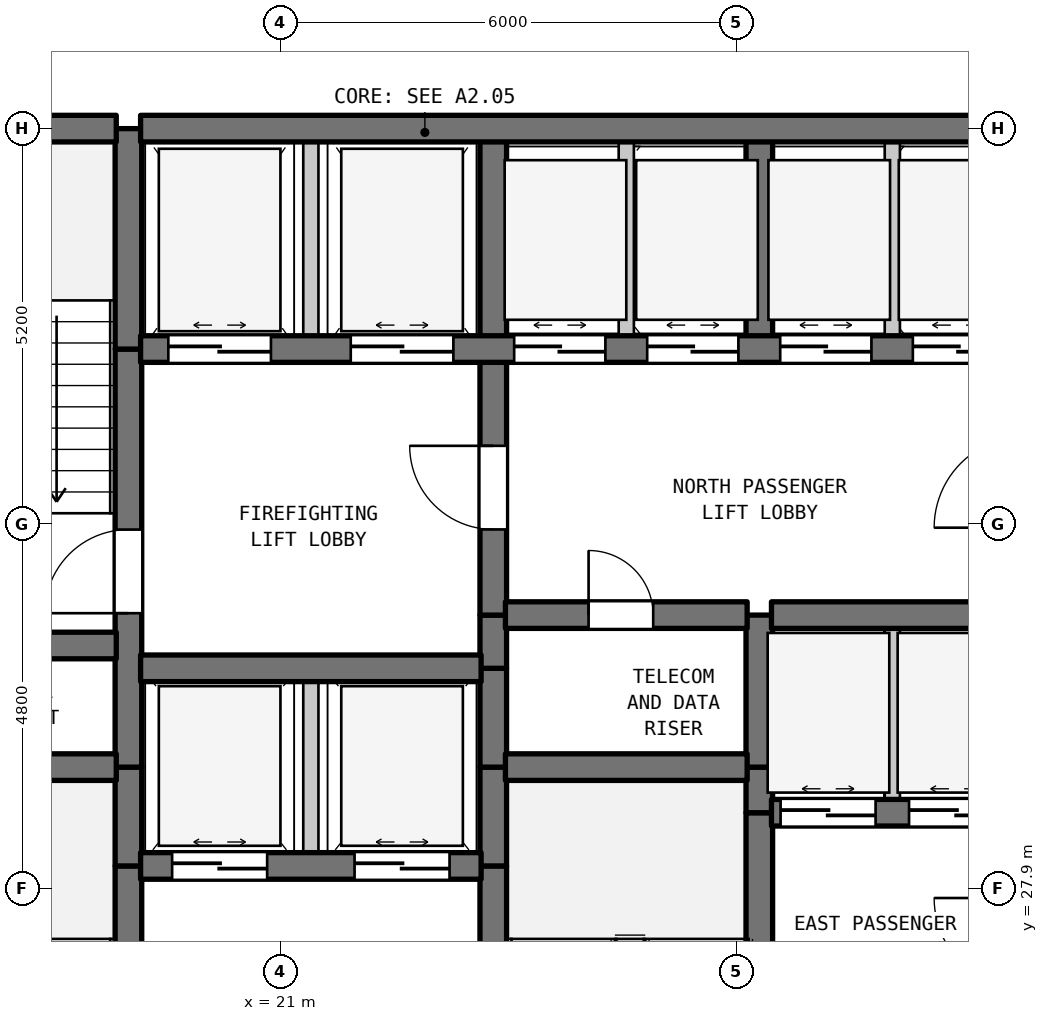
"""IFC4 building model, lengths in metres.
Left out: names, types, materials, properties, quantities, classifications, styles, units other than length and angle.
Written with IfcOpenShell. Run it as: python <this file> out.ifc"""

import sys

from ifc_helpers import new_model, si_unit, direction, frame, frame_2d, origin, place, context, subcontext, project, spatial, rectangle, extrude, element, fill, save


model = new_model("IFC4")
c1 = context("Model", 3, precision=1e-05, world=origin(), true_north=direction((0.0, 1.0)))
c2 = subcontext(c1, "Body", "Model", "MODEL_VIEW")
j1 = project(units=[si_unit("LENGTHUNIT", "METRE"), si_unit("PLANEANGLEUNIT", "RADIAN")], contexts=[c1])
p1 = place(None, origin())
s1 = spatial("IfcSite", under=j1, at=p1, CompositionType="ELEMENT")
p2 = place(p1, origin())
s2 = spatial("IfcBuilding", under=s1, at=p2, CompositionType="ELEMENT")
p3 = place(p2, frame((0.0, 0.0, 53.6)))
s3 = spatial("IfcBuildingStorey", under=s2, at=p3, CompositionType="ELEMENT", Elevation=53.6)
p4 = place(p3, frame((19.0, 22.7, 0.0), z_axis=(0.0, 0.0, 1.0), x_axis=(0.0, 1.0, 0.0)))
e1 = element("IfcWall", 1, at=p4, inside=s3, PredefinedType="SHEAR", context=c2, shape_type="SweptSolid", body=[
    extrude(rectangle(XDim=5.5, YDim=0.35, at=frame_2d((2.75, 0.0))), origin(), (0.0, 0.0, 1.0), 3.385),
])
p5 = place(p4, frame((0.631, 0.0, 0.0)))
e2 = element("IfcOpeningElement", 2, at=p5, cuts=e1, PredefinedType="OPENING", context=c2, shape_type="SweptSolid", body=[
    extrude(rectangle(XDim=1.1, YDim=2.15, at=frame_2d((0.55, 1.075))), frame((0.0, 0.185, 0.0), z_axis=(0.0, -1.0, 0.0), x_axis=(1.0, 0.0, 0.0)), (0.0, 0.0, 1.0), 0.37),
])
p6 = place(p3, frame((19.0, 28.2, 0.0), z_axis=(0.0, 0.0, 1.0), x_axis=(0.0, 1.0, 0.0)))
e3 = element("IfcWall", 3, at=p6, inside=s3, PredefinedType="SHEAR", context=c2, shape_type="SweptSolid", body=[
    extrude(rectangle(XDim=1.3, YDim=0.35, at=frame_2d((0.65, 0.0))), origin(), (0.0, 0.0, 1.0), 3.385),
])
p7 = place(p3, frame((19.0, 29.5, 0.0), z_axis=(0.0, 0.0, 1.0), x_axis=(0.0, 1.0, 0.0)))
e4 = element("IfcWall", 4, at=p7, inside=s3, PredefinedType="SHEAR", context=c2, shape_type="SweptSolid", body=[
    extrude(rectangle(XDim=5.5, YDim=0.35, at=frame_2d((2.75, 0.0))), origin(), (0.0, 0.0, 1.0), 3.385),
])
p8 = place(p7, frame((2.025, 0.0, 0.0)))
e5 = element("IfcOpeningElement", 5, at=p8, cuts=e4, PredefinedType="OPENING", context=c2, shape_type="SweptSolid", body=[
    extrude(rectangle(XDim=1.1, YDim=2.15, at=frame_2d((0.55, 1.075))), frame((0.0, 0.185, 0.0), z_axis=(0.0, -1.0, 0.0), x_axis=(1.0, 0.0, 0.0)), (0.0, 0.0, 1.0), 0.37),
])
p9 = place(p3, frame((19.0, 35.0, 0.0), z_axis=(0.0, 0.0, 1.0), x_axis=(0.0, 1.0, 0.0)))
e6 = element("IfcWall", 6, at=p9, inside=s3, PredefinedType="SHEAR", context=c2, shape_type="SweptSolid", body=[
    extrude(rectangle(XDim=2.9, YDim=0.35, at=frame_2d((1.45, 0.0))), origin(), (0.0, 0.0, 1.0), 3.385),
])
p10 = place(p3, frame((21.4, 28.2, 0.0), z_axis=(0.0, 0.0, 1.0), x_axis=(0.0, 1.0, 0.0)))
e7 = element("IfcWall", 7, at=p10, inside=s3, PredefinedType="STANDARD", context=c2, shape_type="SweptSolid", body=[
    extrude(rectangle(XDim=2.6, YDim=0.2, at=frame_2d((1.3, 0.0))), origin(), (0.0, 0.0, 1.0), 3.385),
])
p11 = place(p3, frame((21.4, 35.0, 0.0), z_axis=(0.0, 0.0, 1.0), x_axis=(0.0, 1.0, 0.0)))
e8 = element("IfcWall", 8, at=p11, inside=s3, PredefinedType="STANDARD", context=c2, shape_type="SweptSolid", body=[
    extrude(rectangle(XDim=2.9, YDim=0.2, at=frame_2d((1.45, 0.0))), origin(), (0.0, 0.0, 1.0), 3.385),
])
p12 = place(p3, frame((23.8, 22.7, 0.0), z_axis=(0.0, 0.0, 1.0), x_axis=(0.0, 1.0, 0.0)))
e9 = element("IfcWall", 9, at=p12, inside=s3, PredefinedType="SHEAR", context=c2, shape_type="SweptSolid", body=[
    extrude(rectangle(XDim=5.5, YDim=0.35, at=frame_2d((2.75, 0.0))), origin(), (0.0, 0.0, 1.0), 3.385),
])
p13 = place(p12, frame((0.235, 0.0, 0.0)))
e10 = element("IfcOpeningElement", 10, at=p13, cuts=e9, PredefinedType="OPENING", context=c2, shape_type="SweptSolid", body=[
    extrude(rectangle(XDim=1.1, YDim=2.15, at=frame_2d((0.55, 1.075))), frame((0.0, 0.185, 0.0), z_axis=(0.0, -1.0, 0.0), x_axis=(1.0, 0.0, 0.0)), (0.0, 0.0, 1.0), 0.37),
])
for number, where, z_axis, x_axis in (
    (11, (23.8, 28.2, 0.0), (0.0, 0.0, 1.0), (0.0, 1.0, 0.0)),
    (12, (23.8, 29.5, 0.0), (0.0, 0.0, 1.0), (0.0, 1.0, 0.0)),
):
    element("IfcWall", number, at=place(p3, frame(where, z_axis=z_axis, x_axis=x_axis)), inside=s3, PredefinedType="SHEAR", context=c2, shape_type="SweptSolid", body=[
        extrude(rectangle(XDim=1.3, YDim=0.35, at=frame_2d((0.65, 0.0))), origin(), (0.0, 0.0, 1.0), 3.385),
    ])
p14 = place(p3, frame((23.8, 30.8, 0.0), z_axis=(0.0, 0.0, 1.0), x_axis=(0.0, 1.0, 0.0)))
e13 = element("IfcWall", 13, at=p14, inside=s3, PredefinedType="SHEAR", context=c2, shape_type="SweptSolid", body=[
    extrude(rectangle(XDim=0.7, YDim=0.35, at=frame_2d((0.35, 0.0))), origin(), (0.0, 0.0, 1.0), 3.385),
])
p15 = place(p3, frame((23.8, 31.5, 0.0), z_axis=(0.0, 0.0, 1.0), x_axis=(0.0, 1.0, 0.0)))
e14 = element("IfcWall", 14, at=p15, inside=s3, PredefinedType="SHEAR", context=c2, shape_type="SweptSolid", body=[
    extrude(rectangle(XDim=3.5, YDim=0.35, at=frame_2d((1.75, 0.0))), origin(), (0.0, 0.0, 1.0), 3.385),
])
p16 = place(p15, frame((1.127, 0.0, 0.0)))
e15 = element("IfcOpeningElement", 15, at=p16, cuts=e14, PredefinedType="OPENING", context=c2, shape_type="SweptSolid", body=[
    extrude(rectangle(XDim=1.1, YDim=2.15, at=frame_2d((0.55, 1.075))), frame((0.0, 0.185, 0.0), z_axis=(0.0, -1.0, 0.0), x_axis=(1.0, 0.0, 0.0)), (0.0, 0.0, 1.0), 0.37),
])
p17 = place(p3, frame((23.8, 35.0, 0.0), z_axis=(0.0, 0.0, 1.0), x_axis=(0.0, 1.0, 0.0)))
e16 = element("IfcWall", 16, at=p17, inside=s3, PredefinedType="SHEAR", context=c2, shape_type="SweptSolid", body=[
    extrude(rectangle(XDim=2.9, YDim=0.35, at=frame_2d((1.45, 0.0))), origin(), (0.0, 0.0, 1.0), 3.385),
])
p18 = place(p3, frame((25.55, 35.0, 0.0), z_axis=(0.0, 0.0, 1.0), x_axis=(0.0, 1.0, 0.0)))
e17 = element("IfcWall", 17, at=p18, inside=s3, PredefinedType="STANDARD", context=c2, shape_type="SweptSolid", body=[
    extrude(rectangle(XDim=2.9, YDim=0.2, at=frame_2d((1.45, 0.0))), origin(), (0.0, 0.0, 1.0), 3.385),
])
p19 = place(p3, frame((27.3, 25.6, 0.0), z_axis=(0.0, 0.0, 1.0), x_axis=(0.0, 1.0, 0.0)))
e18 = element("IfcWall", 18, at=p19, inside=s3, PredefinedType="SHEAR", context=c2, shape_type="SweptSolid", body=[
    extrude(rectangle(XDim=3.3, YDim=0.35, at=frame_2d((1.65, 0.0))), origin(), (0.0, 0.0, 1.0), 3.385),
])
p20 = place(p3, frame((27.3, 28.9, 0.0), z_axis=(0.0, 0.0, 1.0), x_axis=(0.0, 1.0, 0.0)))
e19 = element("IfcWall", 19, at=p20, inside=s3, PredefinedType="SHEAR", context=c2, shape_type="SweptSolid", body=[
    extrude(rectangle(XDim=0.6, YDim=0.35, at=frame_2d((0.3, 0.0))), origin(), (0.0, 0.0, 1.0), 3.385),
])
p21 = place(p3, frame((27.3, 29.5, 0.0), z_axis=(0.0, 0.0, 1.0), x_axis=(0.0, 1.0, 0.0)))
e20 = element("IfcWall", 20, at=p21, inside=s3, PredefinedType="SHEAR", context=c2, shape_type="SweptSolid", body=[
    extrude(rectangle(XDim=2.0, YDim=0.35, at=frame_2d((1.0, 0.0))), origin(), (0.0, 0.0, 1.0), 3.385),
])
p22 = place(p3, frame((27.3, 35.0, 0.0), z_axis=(0.0, 0.0, 1.0), x_axis=(0.0, 1.0, 0.0)))
e21 = element("IfcWall", 21, at=p22, inside=s3, PredefinedType="SHEAR", context=c2, shape_type="SweptSolid", body=[
    extrude(rectangle(XDim=2.9, YDim=0.35, at=frame_2d((1.45, 0.0))), origin(), (0.0, 0.0, 1.0), 3.385),
])
p23 = place(p3, frame((29.05, 28.9, 0.0), z_axis=(0.0, 0.0, 1.0), x_axis=(0.0, 1.0, 0.0)))
e22 = element("IfcWall", 22, at=p23, inside=s3, PredefinedType="STANDARD", context=c2, shape_type="SweptSolid", body=[
    extrude(rectangle(XDim=2.6, YDim=0.2, at=frame_2d((1.3, 0.0))), origin(), (0.0, 0.0, 1.0), 3.385),
])
p24 = place(p3, frame((29.05, 35.0, 0.0), z_axis=(0.0, 0.0, 1.0), x_axis=(0.0, 1.0, 0.0)))
e23 = element("IfcWall", 23, at=p24, inside=s3, PredefinedType="STANDARD", context=c2, shape_type="SweptSolid", body=[
    extrude(rectangle(XDim=2.9, YDim=0.2, at=frame_2d((1.45, 0.0))), origin(), (0.0, 0.0, 1.0), 3.385),
])
p25 = place(p3, frame((19.16, 28.2, 0.0), z_axis=(0.0, 0.0, 1.0), x_axis=(1.0, 0.0, 0.0)))
e24 = element("IfcWall", 24, at=p25, inside=s3, PredefinedType="SHEAR", context=c2, shape_type="SweptSolid", body=[
    extrude(rectangle(XDim=4.48, YDim=0.35, at=frame_2d((2.24, 0.0))), origin(), (0.0, 0.0, 1.0), 3.385),
])
p26 = place(p25, frame((0.415, 0.0, 0.0)))
e25 = element("IfcOpeningElement", 25, at=p26, cuts=e24, PredefinedType="OPENING", context=c2, shape_type="SweptSolid", body=[
    extrude(rectangle(XDim=1.25, YDim=2.2, at=frame_2d((0.625, 1.1))), frame((0.0, 0.185, 0.0), z_axis=(0.0, -1.0, 0.0), x_axis=(1.0, 0.0, 0.0)), (0.0, 0.0, 1.0), 0.37),
])
p27 = place(p25, frame((2.815, 0.0, 0.0)))
e26 = element("IfcOpeningElement", 26, at=p27, cuts=e24, PredefinedType="OPENING", context=c2, shape_type="SweptSolid", body=[
    extrude(rectangle(XDim=1.25, YDim=2.2, at=frame_2d((0.625, 1.1))), frame((0.0, 0.185, 0.0), z_axis=(0.0, -1.0, 0.0), x_axis=(1.0, 0.0, 0.0)), (0.0, 0.0, 1.0), 0.37),
])
p28 = place(p3, frame((27.46, 28.9, 0.0), z_axis=(0.0, 0.0, 1.0), x_axis=(1.0, 0.0, 0.0)))
e27 = element("IfcWall", 27, at=p28, inside=s3, PredefinedType="SHEAR", context=c2, shape_type="SweptSolid", body=[
    extrude(rectangle(XDim=3.18, YDim=0.35, at=frame_2d((1.59, 0.0))), origin(), (0.0, 0.0, 1.0), 3.385),
])
p29 = place(p28, frame((0.12, 0.0, 0.0)))
e28 = element("IfcOpeningElement", 28, at=p29, cuts=e27, PredefinedType="OPENING", context=c2, shape_type="SweptSolid", body=[
    extrude(rectangle(XDim=1.25, YDim=2.2, at=frame_2d((0.625, 1.1))), frame((0.0, 0.185, 0.0), z_axis=(0.0, -1.0, 0.0), x_axis=(1.0, 0.0, 0.0)), (0.0, 0.0, 1.0), 0.37),
])
p30 = place(p28, frame((1.81, 0.0, 0.0)))
e29 = element("IfcOpeningElement", 29, at=p30, cuts=e27, PredefinedType="OPENING", context=c2, shape_type="SweptSolid", body=[
    extrude(rectangle(XDim=1.25, YDim=2.2, at=frame_2d((0.625, 1.1))), frame((0.0, 0.185, 0.0), z_axis=(0.0, -1.0, 0.0), x_axis=(1.0, 0.0, 0.0)), (0.0, 0.0, 1.0), 0.37),
])
p31 = place(p3, frame((15.16, 29.5, 0.0), z_axis=(0.0, 0.0, 1.0), x_axis=(1.0, 0.0, 0.0)))
e30 = element("IfcWall", 30, at=p31, inside=s3, PredefinedType="SHEAR", context=c2, shape_type="SweptSolid", body=[
    extrude(rectangle(XDim=3.68, YDim=0.35, at=frame_2d((1.84, 0.0))), origin(), (0.0, 0.0, 1.0), 3.385),
])
p32 = place(p3, frame((23.96, 29.5, 0.0), z_axis=(0.0, 0.0, 1.0), x_axis=(1.0, 0.0, 0.0)))
e31 = element("IfcWall", 31, at=p32, inside=s3, PredefinedType="SHEAR", context=c2, shape_type="SweptSolid", body=[
    extrude(rectangle(XDim=3.18, YDim=0.35, at=frame_2d((1.59, 0.0))), origin(), (0.0, 0.0, 1.0), 3.385),
])
p33 = place(p3, frame((19.16, 30.8, 0.0), z_axis=(0.0, 0.0, 1.0), x_axis=(1.0, 0.0, 0.0)))
e32 = element("IfcWall", 32, at=p33, inside=s3, PredefinedType="SHEAR", context=c2, shape_type="SweptSolid", body=[
    extrude(rectangle(XDim=4.48, YDim=0.35, at=frame_2d((2.24, 0.0))), origin(), (0.0, 0.0, 1.0), 3.385),
])
p34 = place(p3, frame((15.16, 31.1, 0.0), z_axis=(0.0, 0.0, 1.0), x_axis=(1.0, 0.0, 0.0)))
e33 = element("IfcWall", 33, at=p34, inside=s3, PredefinedType="SHEAR", context=c2, shape_type="SweptSolid", body=[
    extrude(rectangle(XDim=3.68, YDim=0.35, at=frame_2d((1.84, 0.0))), origin(), (0.0, 0.0, 1.0), 3.385),
])
p35 = place(p3, frame((23.96, 31.5, 0.0), z_axis=(0.0, 0.0, 1.0), x_axis=(1.0, 0.0, 0.0)))
e34 = element("IfcWall", 34, at=p35, inside=s3, PredefinedType="SHEAR", context=c2, shape_type="SweptSolid", body=[
    extrude(rectangle(XDim=3.18, YDim=0.35, at=frame_2d((1.59, 0.0))), origin(), (0.0, 0.0, 1.0), 3.385),
])
p36 = place(p35, frame((1.094, 0.0, 0.0)))
e35 = element("IfcOpeningElement", 35, at=p36, cuts=e34, PredefinedType="OPENING", context=c2, shape_type="SweptSolid", body=[
    extrude(rectangle(XDim=0.85, YDim=2.1, at=frame_2d((0.425, 1.05))), frame((0.0, 0.185, 0.0), z_axis=(0.0, -1.0, 0.0), x_axis=(1.0, 0.0, 0.0)), (0.0, 0.0, 1.0), 0.37),
])
p37 = place(p3, frame((27.46, 31.5, 0.0), z_axis=(0.0, 0.0, 1.0), x_axis=(1.0, 0.0, 0.0)))
e36 = element("IfcWall", 36, at=p37, inside=s3, PredefinedType="SHEAR", context=c2, shape_type="SweptSolid", body=[
    extrude(rectangle(XDim=3.18, YDim=0.35, at=frame_2d((1.59, 0.0))), origin(), (0.0, 0.0, 1.0), 3.385),
])
p38 = place(p3, frame((19.16, 35.0, 0.0), z_axis=(0.0, 0.0, 1.0), x_axis=(1.0, 0.0, 0.0)))
e37 = element("IfcWall", 37, at=p38, inside=s3, PredefinedType="SHEAR", context=c2, shape_type="SweptSolid", body=[
    extrude(rectangle(XDim=11.48, YDim=0.35, at=frame_2d((5.74, 0.0))), origin(), (0.0, 0.0, 1.0), 3.385),
])
p39 = place(p38, frame((0.365, 0.0, 0.0)))
e38 = element("IfcOpeningElement", 38, at=p39, cuts=e37, PredefinedType="OPENING", context=c2, shape_type="SweptSolid", body=[
    extrude(rectangle(XDim=1.35, YDim=2.2, at=frame_2d((0.675, 1.1))), frame((0.0, 0.185, 0.0), z_axis=(0.0, -1.0, 0.0), x_axis=(1.0, 0.0, 0.0)), (0.0, 0.0, 1.0), 0.37),
])
p40 = place(p38, frame((2.765, 0.0, 0.0)))
e39 = element("IfcOpeningElement", 39, at=p40, cuts=e37, PredefinedType="OPENING", context=c2, shape_type="SweptSolid", body=[
    extrude(rectangle(XDim=1.35, YDim=2.2, at=frame_2d((0.675, 1.1))), frame((0.0, 0.185, 0.0), z_axis=(0.0, -1.0, 0.0), x_axis=(1.0, 0.0, 0.0)), (0.0, 0.0, 1.0), 0.37),
])
p41 = place(p38, frame((4.915, 0.0, 0.0)))
e40 = element("IfcOpeningElement", 40, at=p41, cuts=e37, PredefinedType="OPENING", context=c2, shape_type="SweptSolid", body=[
    extrude(rectangle(XDim=1.2, YDim=2.2, at=frame_2d((0.6, 1.1))), frame((0.0, 0.185, 0.0), z_axis=(0.0, -1.0, 0.0), x_axis=(1.0, 0.0, 0.0)), (0.0, 0.0, 1.0), 0.37),
])
p42 = place(p38, frame((6.665, 0.0, 0.0)))
e41 = element("IfcOpeningElement", 41, at=p42, cuts=e37, PredefinedType="OPENING", context=c2, shape_type="SweptSolid", body=[
    extrude(rectangle(XDim=1.2, YDim=2.2, at=frame_2d((0.6, 1.1))), frame((0.0, 0.185, 0.0), z_axis=(0.0, -1.0, 0.0), x_axis=(1.0, 0.0, 0.0)), (0.0, 0.0, 1.0), 0.37),
])
p43 = place(p38, frame((8.415, 0.0, 0.0)))
e42 = element("IfcOpeningElement", 42, at=p43, cuts=e37, PredefinedType="OPENING", context=c2, shape_type="SweptSolid", body=[
    extrude(rectangle(XDim=1.2, YDim=2.2, at=frame_2d((0.6, 1.1))), frame((0.0, 0.185, 0.0), z_axis=(0.0, -1.0, 0.0), x_axis=(1.0, 0.0, 0.0)), (0.0, 0.0, 1.0), 0.37),
])
p44 = place(p38, frame((10.16, 0.0, 0.0)))
e43 = element("IfcOpeningElement", 43, at=p44, cuts=e37, PredefinedType="OPENING", context=c2, shape_type="SweptSolid", body=[
    extrude(rectangle(XDim=1.2, YDim=2.2, at=frame_2d((0.6, 1.1))), frame((0.0, 0.185, 0.0), z_axis=(0.0, -1.0, 0.0), x_axis=(1.0, 0.0, 0.0)), (0.0, 0.0, 1.0), 0.37),
])
p45 = place(p3, frame((15.16, 37.9, 0.0), z_axis=(0.0, 0.0, 1.0), x_axis=(1.0, 0.0, 0.0)))
e44 = element("IfcWall", 44, at=p45, inside=s3, PredefinedType="SHEAR", context=c2, shape_type="SweptSolid", body=[
    extrude(rectangle(XDim=3.68, YDim=0.35, at=frame_2d((1.84, 0.0))), origin(), (0.0, 0.0, 1.0), 3.385),
])
p46 = place(p3, frame((19.16, 37.9, 0.0), z_axis=(0.0, 0.0, 1.0), x_axis=(1.0, 0.0, 0.0)))
e45 = element("IfcWall", 45, at=p46, inside=s3, PredefinedType="SHEAR", context=c2, shape_type="SweptSolid", body=[
    extrude(rectangle(XDim=11.48, YDim=0.35, at=frame_2d((5.74, 0.0))), origin(), (0.0, 0.0, 1.0), 3.385),
])
p47 = place(p8, origin())
e46 = element("IfcDoor", 46, at=p47, inside=s3, OperationType="SINGLE_SWING_LEFT", PredefinedType="DOOR", context=c2, shape_type="SweptSolid", body=[
    extrude(rectangle(XDim=1.1, YDim=2.15, at=frame_2d((0.55, 1.075))), frame((0.0, 0.025, 0.0), z_axis=(0.0, -1.0, 0.0), x_axis=(1.0, 0.0, 0.0)), (0.0, 0.0, 1.0), 0.05),
])
fill(e5, e46)
p48 = place(p16, origin())
e47 = element("IfcDoor", 47, at=p48, inside=s3, OperationType="SINGLE_SWING_RIGHT", PredefinedType="DOOR", context=c2, shape_type="SweptSolid", body=[
    extrude(rectangle(XDim=1.1, YDim=2.15, at=frame_2d((0.55, 1.075))), frame((0.0, 0.025, 0.0), z_axis=(0.0, -1.0, 0.0), x_axis=(1.0, 0.0, 0.0)), (0.0, 0.0, 1.0), 0.05),
])
fill(e15, e47)
p49 = place(p26, origin())
e48 = element("IfcDoor", 48, at=p49, inside=s3, OperationType="DOUBLE_DOOR_SLIDING", PredefinedType="DOOR", context=c2, shape_type="SweptSolid", body=[
    extrude(rectangle(XDim=1.25, YDim=2.2, at=frame_2d((0.625, 1.1))), frame((0.0, 0.025, 0.0), z_axis=(0.0, -1.0, 0.0), x_axis=(1.0, 0.0, 0.0)), (0.0, 0.0, 1.0), 0.05),
])
fill(e25, e48)
p50 = place(p27, origin())
e49 = element("IfcDoor", 49, at=p50, inside=s3, OperationType="DOUBLE_DOOR_SLIDING", PredefinedType="DOOR", context=c2, shape_type="SweptSolid", body=[
    extrude(rectangle(XDim=1.25, YDim=2.2, at=frame_2d((0.625, 1.1))), frame((0.0, 0.025, 0.0), z_axis=(0.0, -1.0, 0.0), x_axis=(1.0, 0.0, 0.0)), (0.0, 0.0, 1.0), 0.05),
])
fill(e26, e49)
p51 = place(p29, origin())
e50 = element("IfcDoor", 50, at=p51, inside=s3, OperationType="DOUBLE_DOOR_SLIDING", PredefinedType="DOOR", context=c2, shape_type="SweptSolid", body=[
    extrude(rectangle(XDim=1.25, YDim=2.2, at=frame_2d((0.625, 1.1))), frame((0.0, 0.025, 0.0), z_axis=(0.0, -1.0, 0.0), x_axis=(1.0, 0.0, 0.0)), (0.0, 0.0, 1.0), 0.05),
])
fill(e28, e50)
p52 = place(p30, origin())
e51 = element("IfcDoor", 51, at=p52, inside=s3, OperationType="DOUBLE_DOOR_SLIDING", PredefinedType="DOOR", context=c2, shape_type="SweptSolid", body=[
    extrude(rectangle(XDim=1.25, YDim=2.2, at=frame_2d((0.625, 1.1))), frame((0.0, 0.025, 0.0), z_axis=(0.0, -1.0, 0.0), x_axis=(1.0, 0.0, 0.0)), (0.0, 0.0, 1.0), 0.05),
])
fill(e29, e51)
p53 = place(p36, origin())
e52 = element("IfcDoor", 52, at=p53, inside=s3, OperationType="SINGLE_SWING_LEFT", PredefinedType="DOOR", context=c2, shape_type="SweptSolid", body=[
    extrude(rectangle(XDim=0.85, YDim=2.1, at=frame_2d((0.425, 1.05))), frame((0.0, 0.025, 0.0), z_axis=(0.0, -1.0, 0.0), x_axis=(1.0, 0.0, 0.0)), (0.0, 0.0, 1.0), 0.05),
])
fill(e35, e52)
p54 = place(p39, origin())
e53 = element("IfcDoor", 53, at=p54, inside=s3, OperationType="DOUBLE_DOOR_SLIDING", PredefinedType="DOOR", context=c2, shape_type="SweptSolid", body=[
    extrude(rectangle(XDim=1.35, YDim=2.2, at=frame_2d((0.675, 1.1))), frame((0.0, 0.025, 0.0), z_axis=(0.0, -1.0, 0.0), x_axis=(1.0, 0.0, 0.0)), (0.0, 0.0, 1.0), 0.05),
])
fill(e38, e53)
p55 = place(p40, origin())
e54 = element("IfcDoor", 54, at=p55, inside=s3, OperationType="DOUBLE_DOOR_SLIDING", PredefinedType="DOOR", context=c2, shape_type="SweptSolid", body=[
    extrude(rectangle(XDim=1.35, YDim=2.2, at=frame_2d((0.675, 1.1))), frame((0.0, 0.025, 0.0), z_axis=(0.0, -1.0, 0.0), x_axis=(1.0, 0.0, 0.0)), (0.0, 0.0, 1.0), 0.05),
])
fill(e39, e54)
p56 = place(p41, origin())
e55 = element("IfcDoor", 55, at=p56, inside=s3, OperationType="DOUBLE_DOOR_SLIDING", PredefinedType="DOOR", context=c2, shape_type="SweptSolid", body=[
    extrude(rectangle(XDim=1.2, YDim=2.2, at=frame_2d((0.6, 1.1))), frame((0.0, 0.025, 0.0), z_axis=(0.0, -1.0, 0.0), x_axis=(1.0, 0.0, 0.0)), (0.0, 0.0, 1.0), 0.05),
])
fill(e40, e55)
p57 = place(p42, origin())
e56 = element("IfcDoor", 56, at=p57, inside=s3, OperationType="DOUBLE_DOOR_SLIDING", PredefinedType="DOOR", context=c2, shape_type="SweptSolid", body=[
    extrude(rectangle(XDim=1.2, YDim=2.2, at=frame_2d((0.6, 1.1))), frame((0.0, 0.025, 0.0), z_axis=(0.0, -1.0, 0.0), x_axis=(1.0, 0.0, 0.0)), (0.0, 0.0, 1.0), 0.05),
])
fill(e41, e56)
p58 = place(p43, origin())
e57 = element("IfcDoor", 57, at=p58, inside=s3, OperationType="DOUBLE_DOOR_SLIDING", PredefinedType="DOOR", context=c2, shape_type="SweptSolid", body=[
    extrude(rectangle(XDim=1.2, YDim=2.2, at=frame_2d((0.6, 1.1))), frame((0.0, 0.025, 0.0), z_axis=(0.0, -1.0, 0.0), x_axis=(1.0, 0.0, 0.0)), (0.0, 0.0, 1.0), 0.05),
])
fill(e42, e57)
p59 = place(p44, origin())
e58 = element("IfcDoor", 58, at=p59, inside=s3, OperationType="DOUBLE_DOOR_SLIDING", PredefinedType="DOOR", context=c2, shape_type="SweptSolid", body=[
    extrude(rectangle(XDim=1.2, YDim=2.2, at=frame_2d((0.6, 1.1))), frame((0.0, 0.025, 0.0), z_axis=(0.0, -1.0, 0.0), x_axis=(1.0, 0.0, 0.0)), (0.0, 0.0, 1.0), 0.05),
])
fill(e43, e58)
save(model, sys.argv[1])
